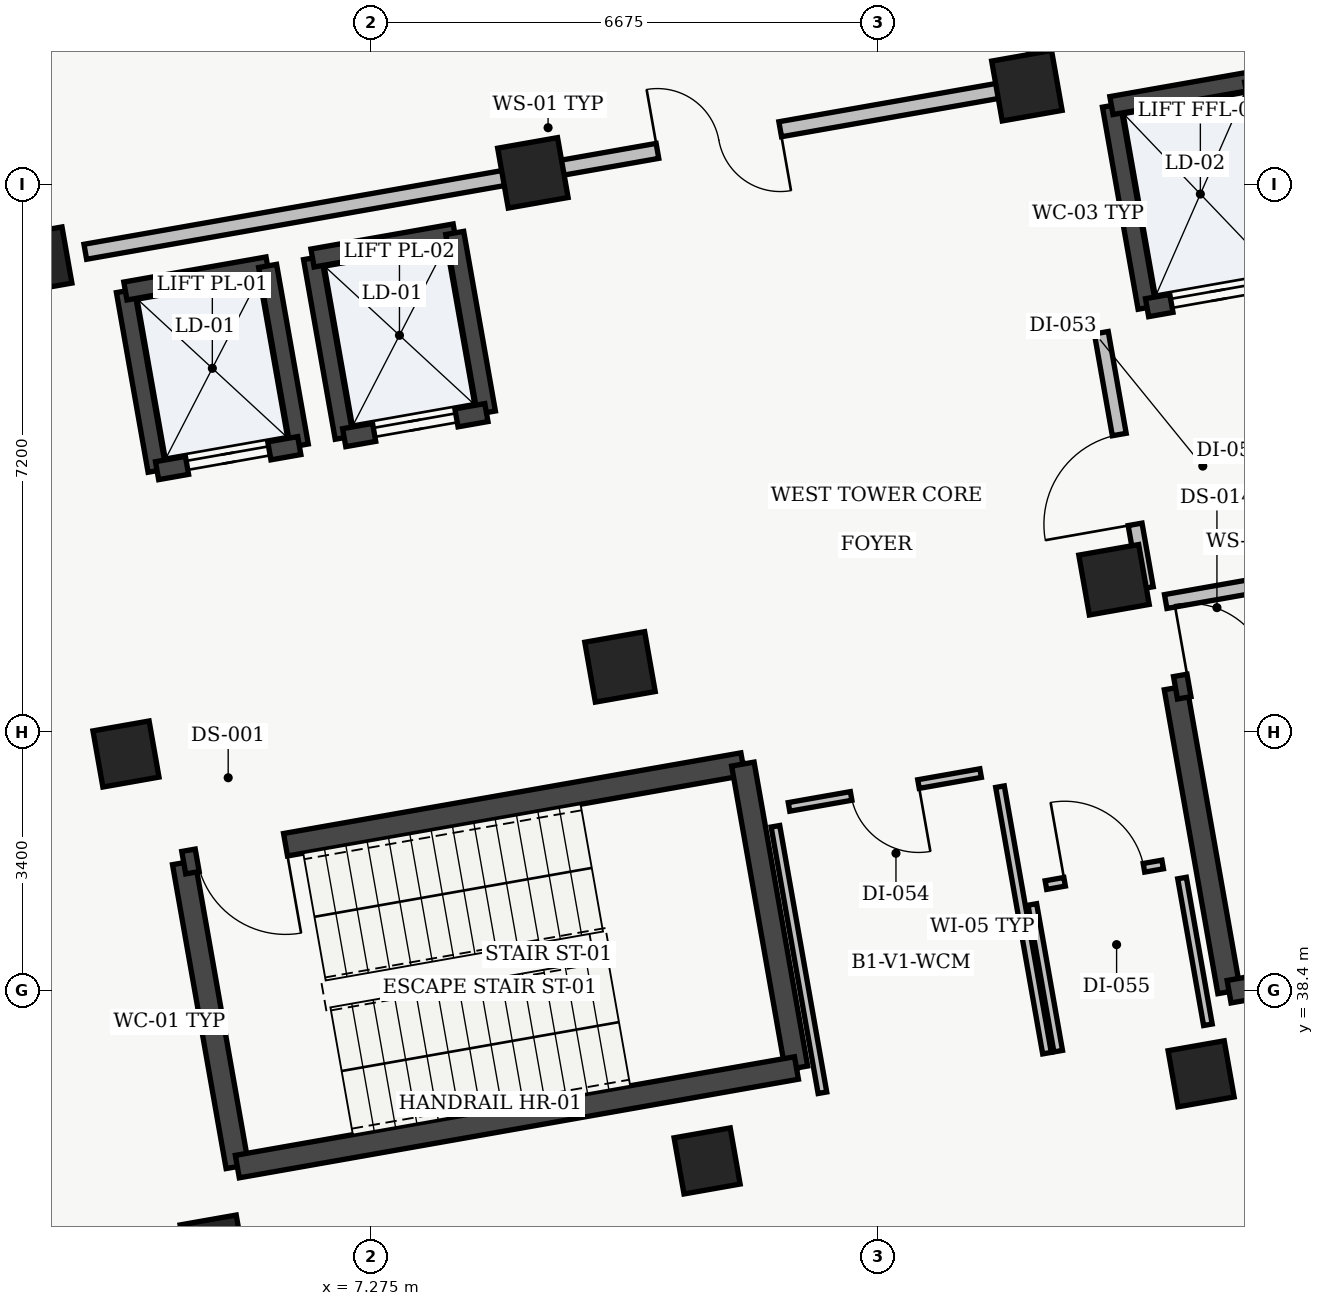
"""IFC4 building model, lengths in metres.
Left out: names, types, materials, properties, quantities, classifications, styles, units other than length and angle.
Written with IfcOpenShell. Run it as: python <this file> out.ifc"""

import sys

from ifc_helpers import new_model, si_unit, direction, frame, frame_2d, origin, origin_2d, place, context, subcontext, project, spatial, rectangle, extrude, element, fill, save


model = new_model("IFC4")
c1 = context("Model", 3, precision=1e-05, world=origin(), true_north=direction((0.0, 1.0)))
c2 = subcontext(c1, "Body", "Model", "MODEL_VIEW")
j1 = project(units=[si_unit("LENGTHUNIT", "METRE"), si_unit("PLANEANGLEUNIT", "RADIAN")], contexts=[c1])
p1 = place(None, origin())
s1 = spatial("IfcSite", under=j1, at=p1, CompositionType="ELEMENT")
p2 = place(p1, origin())
s2 = spatial("IfcBuilding", under=s1, at=p2, CompositionType="ELEMENT")
p3 = place(p2, frame((0.0, 0.0, -4.8)))
s3 = spatial("IfcBuildingStorey", under=s2, at=p3, CompositionType="ELEMENT", Elevation=-4.8)
for number, where, z_axis, x_axis in (
    (1, (5.2, 35.01, 0.0), (0.0, 0.0, 1.0), (0.985, 0.174, 0.0)),
    (2, (4.054, 41.51, 0.0), (0.0, 0.0, 1.0), (0.985, 0.174, 0.0)),
    (3, (2.908, 48.01, 0.0), (0.0, 0.0, 1.0), (0.985, 0.174, 0.0)),
    (4, (11.7, 36.156, 0.0), (0.0, 0.0, 1.0), (0.985, 0.174, 0.0)),
):
    element("IfcColumn", number, at=place(p3, frame(where, z_axis=z_axis, x_axis=x_axis)), inside=s3, PredefinedType="COLUMN", context=c2, shape_type="SweptSolid", body=[
        extrude(rectangle(XDim=0.75, YDim=0.75, at=origin_2d()), origin(), (0.0, 0.0, 1.0), 4.61),
    ])
for number, where, z_axis, x_axis in (
    (5, (10.554, 42.656, 0.0), (0.0, 0.0, 1.0), (0.985, 0.174, 0.0)),
    (6, (9.407, 49.156, 0.0), (0.0, 0.0, 1.0), (0.985, 0.174, 0.0)),
):
    element("IfcColumn", number, at=place(p3, frame(where, z_axis=z_axis, x_axis=x_axis)), inside=s3, PredefinedType="COLUMN", context=c2, shape_type="SweptSolid", body=[
        extrude(rectangle(XDim=0.8, YDim=0.8, at=origin_2d()), origin(), (0.0, 0.0, 1.0), 4.61),
    ])
p4 = place(p3, frame((18.199, 37.302, 0.0), z_axis=(0.0, 0.0, 1.0), x_axis=(0.984807753012, 0.173648177667, 0.0)))
e7 = element("IfcColumn", 7, at=p4, inside=s3, PredefinedType="COLUMN", context=c2, shape_type="SweptSolid", body=[
    extrude(rectangle(XDim=0.75, YDim=0.75, at=origin_2d()), origin(), (0.0, 0.0, 1.0), 4.61),
])
for number, where, z_axis, x_axis in (
    (8, (17.053, 43.802, 0.0), (0.0, 0.0, 1.0), (0.985, 0.174, 0.0)),
    (9, (15.907, 50.302, 0.0), (0.0, 0.0, 1.0), (0.985, 0.174, 0.0)),
):
    element("IfcColumn", number, at=place(p3, frame(where, z_axis=z_axis, x_axis=x_axis)), inside=s3, PredefinedType="COLUMN", context=c2, shape_type="SweptSolid", body=[
        extrude(rectangle(XDim=0.8, YDim=0.8, at=origin_2d()), origin(), (0.0, 0.0, 1.0), 4.61),
    ])
p5 = place(p3, frame((5.519, 36.082, 0.0), z_axis=(0.0, 0.0, 1.0), x_axis=(-0.173665267602, 0.984804739443, 0.0)))
e10 = element("IfcWall", 10, at=p5, inside=s3, PredefinedType="SHEAR", context=c2, shape_type="SweptSolid", body=[
    extrude(rectangle(XDim=4.06, YDim=0.3, at=frame_2d((2.03, 0.0))), origin(), (0.0, 0.0, 1.0), 4.58),
])
p6 = place(p3, frame((4.814, 40.08, 0.0), z_axis=(0.0, 0.0, 1.0), x_axis=(0.984802636214, 0.173677193974, 0.0)))
e11 = element("IfcWall", 11, at=p6, inside=s3, PredefinedType="SHEAR", context=c2, shape_type="SweptSolid", body=[
    extrude(rectangle(XDim=7.47, YDim=0.3, at=frame_2d((3.735, 0.0))), origin(), (0.0, 0.0, 1.0), 4.58),
])
p7 = place(p6, frame((0.18, 0.0, 0.0)))
e12 = element("IfcOpeningElement", 12, at=p7, cuts=e11, PredefinedType="OPENING", context=c2, shape_type="SweptSolid", body=[
    extrude(rectangle(XDim=1.18, YDim=2.15, at=frame_2d((0.59, 1.075))), frame((0.0, 0.15, 0.0), z_axis=(0.0, -1.0, 0.0), x_axis=(1.0, 0.0, 0.0)), (0.0, 0.0, 1.0), 0.3),
])
p8 = place(p3, frame((12.17, 41.377, 0.0), z_axis=(0.0, 0.0, 1.0), x_axis=(0.173654983803, -0.984806552883, 0.0)))
e13 = element("IfcWall", 13, at=p8, inside=s3, PredefinedType="SHEAR", context=c2, shape_type="SweptSolid", body=[
    extrude(rectangle(XDim=4.06, YDim=0.3, at=frame_2d((2.03, 0.0))), origin(), (0.0, 0.0, 1.0), 4.58),
])
p9 = place(p3, frame((12.875, 37.379, 0.0), z_axis=(0.0, 0.0, 1.0), x_axis=(-0.984808225754, -0.173645496596, 0.0)))
e14 = element("IfcWall", 14, at=p9, inside=s3, PredefinedType="SHEAR", context=c2, shape_type="SweptSolid", body=[
    extrude(rectangle(XDim=7.47, YDim=0.3, at=frame_2d((3.735, 0.0))), origin(), (0.0, 0.0, 1.0), 4.58),
])
p10 = place(p3, frame((18.567, 38.383, 0.0), z_axis=(0.0, 0.0, 1.0), x_axis=(-0.173606946886, 0.984815022221, 0.0)))
e15 = element("IfcWall", 15, at=p10, inside=s3, PredefinedType="SHEAR", context=c2, shape_type="SweptSolid", body=[
    extrude(rectangle(XDim=4.06, YDim=0.3, at=frame_2d((2.03, 0.0))), origin(), (0.0, 0.0, 1.0), 4.58),
])
p11 = place(p3, frame((17.863, 42.381, 0.0), z_axis=(0.0, 0.0, 1.0), x_axis=(0.984808225754, 0.173645496596, 0.0)))
e16 = element("IfcWall", 16, at=p11, inside=s3, PredefinedType="SHEAR", context=c2, shape_type="SweptSolid", body=[
    extrude(rectangle(XDim=7.47, YDim=0.3, at=frame_2d((3.735, 0.0))), origin(), (0.0, 0.0, 1.0), 4.58),
])
p12 = place(p11, frame((0.18, 0.0, 0.0)))
e17 = element("IfcOpeningElement", 17, at=p12, cuts=e16, PredefinedType="OPENING", context=c2, shape_type="SweptSolid", body=[
    extrude(rectangle(XDim=1.08, YDim=2.15, at=frame_2d((0.54, 1.075))), frame((0.0, 0.15, 0.0), z_axis=(0.0, -1.0, 0.0), x_axis=(1.0, 0.0, 0.0)), (0.0, 0.0, 1.0), 0.3),
])
p13 = place(p3, frame((25.924, 39.68, 0.0), z_axis=(0.0, 0.0, 1.0), x_axis=(-0.984809211193, -0.173639907711, 0.0)))
e18 = element("IfcWall", 18, at=p13, inside=s3, PredefinedType="SHEAR", context=c2, shape_type="SweptSolid", body=[
    extrude(rectangle(XDim=7.47, YDim=0.3, at=frame_2d((3.735, 0.0))), origin(), (0.0, 0.0, 1.0), 4.58),
])
p14 = place(p3, frame((17.488, 47.382, 0.0), z_axis=(0.0, 0.0, 1.0), x_axis=(-0.173615102578, 0.98481358447, 0.0)))
e19 = element("IfcWall", 19, at=p14, inside=s3, PredefinedType="SHEAR", context=c2, shape_type="SweptSolid", body=[
    extrude(rectangle(XDim=2.7, YDim=0.24, at=frame_2d((1.35, 0.0))), origin(), (0.0, 0.0, 1.0), 4.58),
])
p15 = place(p3, frame((17.02, 50.041, 0.0), z_axis=(0.0, 0.0, 1.0), x_axis=(0.984815882103, 0.173602068988, 0.0)))
e20 = element("IfcWall", 20, at=p15, inside=s3, PredefinedType="SHEAR", context=c2, shape_type="SweptSolid", body=[
    extrude(rectangle(XDim=1.9, YDim=0.24, at=frame_2d((0.95, 0.0))), origin(), (0.0, 0.0, 1.0), 4.58),
])
p16 = place(p3, frame((19.359, 47.712, 0.0), z_axis=(0.0, 0.0, 1.0), x_axis=(-0.984815882103, -0.173602068988, 0.0)))
e21 = element("IfcWall", 21, at=p16, inside=s3, PredefinedType="SHEAR", context=c2, shape_type="SweptSolid", body=[
    extrude(rectangle(XDim=1.9, YDim=0.24, at=frame_2d((0.95, 0.0))), origin(), (0.0, 0.0, 1.0), 4.58),
])
p17 = place(p16, frame((0.325, 0.0, 0.0)))
e22 = element("IfcOpeningElement", 22, at=p17, cuts=e21, PredefinedType="OPENING", context=c2, shape_type="SweptSolid", body=[
    extrude(rectangle(XDim=1.25, YDim=2.2, at=frame_2d((0.625, 1.1))), frame((0.0, 0.12, 0.0), z_axis=(0.0, -1.0, 0.0), x_axis=(1.0, 0.0, 0.0)), (0.0, 0.0, 1.0), 0.24),
])
p18 = place(p3, frame((4.463, 45.237, 0.0), z_axis=(0.0, 0.0, 1.0), x_axis=(-0.173646056486, 0.984808127031, 0.0)))
e23 = element("IfcWall", 23, at=p18, inside=s3, PredefinedType="SHEAR", context=c2, shape_type="SweptSolid", body=[
    extrude(rectangle(XDim=2.4, YDim=0.24, at=frame_2d((1.2, 0.0))), origin(), (0.0, 0.0, 1.0), 4.58),
])
p19 = place(p3, frame((4.046, 47.601, 0.0), z_axis=(0.0, 0.0, 1.0), x_axis=(0.984793905749, 0.173726691098, 0.0)))
e24 = element("IfcWall", 24, at=p19, inside=s3, PredefinedType="SHEAR", context=c2, shape_type="SweptSolid", body=[
    extrude(rectangle(XDim=1.9, YDim=0.24, at=frame_2d((0.95, 0.0))), origin(), (0.0, 0.0, 1.0), 4.58),
])
p20 = place(p3, frame((5.917, 47.931, 0.0), z_axis=(0.0, 0.0, 1.0), x_axis=(0.173646056486, -0.984808127031, 0.0)))
e25 = element("IfcWall", 25, at=p20, inside=s3, PredefinedType="SHEAR", context=c2, shape_type="SweptSolid", body=[
    extrude(rectangle(XDim=2.4, YDim=0.24, at=frame_2d((1.2, 0.0))), origin(), (0.0, 0.0, 1.0), 4.58),
])
p21 = place(p3, frame((6.334, 45.567, 0.0), z_axis=(0.0, 0.0, 1.0), x_axis=(-0.984793905749, -0.173726691098, 0.0)))
e26 = element("IfcWall", 26, at=p21, inside=s3, PredefinedType="SHEAR", context=c2, shape_type="SweptSolid", body=[
    extrude(rectangle(XDim=1.9, YDim=0.24, at=frame_2d((0.95, 0.0))), origin(), (0.0, 0.0, 1.0), 4.58),
])
p22 = place(p21, frame((0.4, 0.0, 0.0)))
e27 = element("IfcOpeningElement", 27, at=p22, cuts=e26, PredefinedType="OPENING", context=c2, shape_type="SweptSolid", body=[
    extrude(rectangle(XDim=1.1, YDim=2.2, at=frame_2d((0.55, 1.1))), frame((0.0, 0.12, 0.0), z_axis=(0.0, -1.0, 0.0), x_axis=(1.0, 0.0, 0.0)), (0.0, 0.0, 1.0), 0.24),
])
p23 = place(p3, frame((6.925, 45.671, 0.0), z_axis=(0.0, 0.0, 1.0), x_axis=(-0.173646056486, 0.984808127031, 0.0)))
e28 = element("IfcWall", 28, at=p23, inside=s3, PredefinedType="SHEAR", context=c2, shape_type="SweptSolid", body=[
    extrude(rectangle(XDim=2.4, YDim=0.24, at=frame_2d((1.2, 0.0))), origin(), (0.0, 0.0, 1.0), 4.58),
])
p24 = place(p3, frame((6.508, 48.035, 0.0), z_axis=(0.0, 0.0, 1.0), x_axis=(0.984793905749, 0.173726691098, 0.0)))
e29 = element("IfcWall", 29, at=p24, inside=s3, PredefinedType="SHEAR", context=c2, shape_type="SweptSolid", body=[
    extrude(rectangle(XDim=1.9, YDim=0.24, at=frame_2d((0.95, 0.0))), origin(), (0.0, 0.0, 1.0), 4.58),
])
p25 = place(p3, frame((8.379, 48.365, 0.0), z_axis=(0.0, 0.0, 1.0), x_axis=(0.173646056486, -0.984808127031, 0.0)))
e30 = element("IfcWall", 30, at=p25, inside=s3, PredefinedType="SHEAR", context=c2, shape_type="SweptSolid", body=[
    extrude(rectangle(XDim=2.4, YDim=0.24, at=frame_2d((1.2, 0.0))), origin(), (0.0, 0.0, 1.0), 4.58),
])
p26 = place(p3, frame((8.796, 46.001, 0.0), z_axis=(0.0, 0.0, 1.0), x_axis=(-0.984793905749, -0.173726691098, 0.0)))
e31 = element("IfcWall", 31, at=p26, inside=s3, PredefinedType="SHEAR", context=c2, shape_type="SweptSolid", body=[
    extrude(rectangle(XDim=1.9, YDim=0.24, at=frame_2d((0.95, 0.0))), origin(), (0.0, 0.0, 1.0), 4.58),
])
p27 = place(p26, frame((0.4, 0.0, 0.0)))
e32 = element("IfcOpeningElement", 32, at=p27, cuts=e31, PredefinedType="OPENING", context=c2, shape_type="SweptSolid", body=[
    extrude(rectangle(XDim=1.1, YDim=2.2, at=frame_2d((0.55, 1.1))), frame((0.0, 0.12, 0.0), z_axis=(0.0, -1.0, 0.0), x_axis=(1.0, 0.0, 0.0)), (0.0, 0.0, 1.0), 0.24),
])
p28 = place(p3, frame((17.733, 43.516, 0.0), z_axis=(0.0, 0.0, 1.0), x_axis=(0.984808483292, 0.173644035992, 0.0)))
e33 = element("IfcWall", 33, at=p28, inside=s3, PredefinedType="SOLIDWALL", context=c2, shape_type="SweptSolid", body=[
    extrude(rectangle(XDim=2.76, YDim=0.185, at=frame_2d((1.38, 0.0))), origin(), (0.0, 0.0, 1.0), 4.25),
])
p29 = place(p3, frame((16.886, 47.052, 0.0), z_axis=(0.0, 0.0, 1.0), x_axis=(0.173621956536, -0.984812376145, 0.0)))
e34 = element("IfcWall", 34, at=p29, inside=s3, PredefinedType="SOLIDWALL", context=c2, shape_type="SweptSolid", body=[
    extrude(rectangle(XDim=3.41, YDim=0.185, at=frame_2d((1.705, 0.0))), origin(), (0.0, 0.0, 1.0), 4.25),
])
p30 = place(p29, frame((1.36, 0.0, 0.0)))
e35 = element("IfcOpeningElement", 35, at=p30, cuts=e34, PredefinedType="OPENING", context=c2, shape_type="SweptSolid", body=[
    extrude(rectangle(XDim=1.2, YDim=2.15, at=frame_2d((0.6, 1.075))), frame((0.0, 0.093, 0.0), z_axis=(0.0, -1.0, 0.0), x_axis=(1.0, 0.0, 0.0)), (0.0, 0.0, 1.0), 0.185),
])
p31 = place(p3, frame((16.171, 37.574, 0.0), z_axis=(0.0, 0.0, 1.0), x_axis=(-0.173644490041, 0.984808403233, 0.0)))
e36 = element("IfcWall", 36, at=p31, inside=s3, PredefinedType="PARTITIONING", context=c2, shape_type="SweptSolid", body=[
    extrude(rectangle(XDim=3.56, YDim=0.115, at=frame_2d((1.78, 0.0))), origin(), (0.0, 0.0, 1.0), 4.25),
])
p32 = place(p3, frame((15.298, 41.259, 0.0), z_axis=(0.0, 0.0, 1.0), x_axis=(-0.984803714572, -0.17367107924, 0.0)))
e37 = element("IfcWall", 37, at=p32, inside=s3, PredefinedType="PARTITIONING", context=c2, shape_type="SweptSolid", body=[
    extrude(rectangle(XDim=2.56, YDim=0.115, at=frame_2d((1.28, 0.0))), origin(), (0.0, 0.0, 1.0), 4.25),
])
p33 = place(p32, frame((0.83, 0.0, 0.0)))
e38 = element("IfcOpeningElement", 38, at=p33, cuts=e37, PredefinedType="OPENING", context=c2, shape_type="SweptSolid", body=[
    extrude(rectangle(XDim=0.9, YDim=2.1, at=frame_2d((0.45, 1.05))), frame((0.0, 0.058, 0.0), z_axis=(0.0, -1.0, 0.0), x_axis=(1.0, 0.0, 0.0)), (0.0, 0.0, 1.0), 0.115),
])
p34 = place(p3, frame((12.599, 40.559, 0.0), z_axis=(0.0, 0.0, 1.0), x_axis=(0.173644490041, -0.984808403233, 0.0)))
e39 = element("IfcWall", 39, at=p34, inside=s3, PredefinedType="PARTITIONING", context=c2, shape_type="SweptSolid", body=[
    extrude(rectangle(XDim=3.56, YDim=0.115, at=frame_2d((1.78, 0.0))), origin(), (0.0, 0.0, 1.0), 4.25),
])
p35 = place(p3, frame((18.289, 37.948, 0.0), z_axis=(0.0, 0.0, 1.0), x_axis=(-0.173643211285, 0.984808628706, 0.0)))
e40 = element("IfcWall", 40, at=p35, inside=s3, PredefinedType="PARTITIONING", context=c2, shape_type="SweptSolid", body=[
    extrude(rectangle(XDim=1.96, YDim=0.115, at=frame_2d((0.98, 0.0))), origin(), (0.0, 0.0, 1.0), 3.945),
])
p36 = place(p3, frame((17.694, 40.056, 0.0), z_axis=(0.0, 0.0, 1.0), x_axis=(-0.984797734253, -0.173704987291, 0.0)))
e41 = element("IfcWall", 41, at=p36, inside=s3, PredefinedType="PARTITIONING", context=c2, shape_type="SweptSolid", body=[
    extrude(rectangle(XDim=1.56, YDim=0.115, at=frame_2d((0.78, 0.0))), origin(), (0.0, 0.0, 1.0), 4.25),
])
p37 = place(p36, frame((0.25, 0.0, 0.0)))
e42 = element("IfcOpeningElement", 42, at=p37, cuts=e41, PredefinedType="OPENING", context=c2, shape_type="SweptSolid", body=[
    extrude(rectangle(XDim=1.06, YDim=2.12, at=frame_2d((0.53, 1.06))), frame((0.0, 0.058, 0.0), z_axis=(0.0, -1.0, 0.0), x_axis=(1.0, 0.0, 0.0)), (0.0, 0.0, 1.0), 0.115),
])
p38 = place(p3, frame((15.979, 39.53, 0.0), z_axis=(0.0, 0.0, 1.0), x_axis=(0.173643211285, -0.984808628706, 0.0)))
e43 = element("IfcWall", 43, at=p38, inside=s3, PredefinedType="PARTITIONING", context=c2, shape_type="SweptSolid", body=[
    extrude(rectangle(XDim=1.96, YDim=0.115, at=frame_2d((0.98, 0.0))), origin(), (0.0, 0.0, 1.0), 4.25),
])
p39 = place(p3, frame((3.518, 48.117, 0.0), z_axis=(0.0, 0.0, 1.0), x_axis=(0.9848097689, 0.173636744608, 0.0)))
e44 = element("IfcWall", 44, at=p39, inside=s3, PredefinedType="SOLIDWALL", context=c2, shape_type="SweptSolid", body=[
    extrude(rectangle(XDim=12.56, YDim=0.2, at=frame_2d((6.28, 0.0))), origin(), (0.0, 0.0, 1.0), 3.845),
])
p40 = place(p39, frame((7.644, 0.0, 0.0)))
e45 = element("IfcOpeningElement", 45, at=p40, cuts=e44, PredefinedType="OPENING", context=c2, shape_type="SweptSolid", body=[
    extrude(rectangle(XDim=1.64, YDim=2.2, at=frame_2d((0.82, 1.1))), frame((0.0, 0.1, 0.0), z_axis=(0.0, -1.0, 0.0), x_axis=(1.0, 0.0, 0.0)), (0.0, 0.0, 1.0), 0.2),
])
p41 = place(p3, frame((16.066, 50.553, 0.0), z_axis=(0.0, 0.0, 1.0), x_axis=(-0.173649928941, 0.984807444214, 0.0)))
e46 = element("IfcWall", 46, at=p41, inside=s3, PredefinedType="SOLIDWALL", context=c2, shape_type="SweptSolid", body=[
    extrude(rectangle(XDim=5.76, YDim=0.2, at=frame_2d((2.88, 0.0))), origin(), (0.0, 0.0, 1.0), 3.945),
])
p42 = place(p3, frame((18.611, 56.851, 0.0), z_axis=(0.0, 0.0, 1.0), x_axis=(0.173656551629, -0.98480627642, 0.0)))
e47 = element("IfcWall", 47, at=p42, inside=s3, PredefinedType="SOLIDWALL", context=c2, shape_type="SweptSolid", body=[
    extrude(rectangle(XDim=8.76, YDim=0.2, at=frame_2d((4.38, 0.0))), origin(), (0.0, 0.0, 1.0), 4.25),
])
p43 = place(p7, origin())
e48 = element("IfcDoor", 48, at=p43, inside=s3, OperationType="SINGLE_SWING_RIGHT", PredefinedType="DOOR", context=c2, shape_type="SweptSolid", body=[
    extrude(rectangle(XDim=1.18, YDim=2.15, at=frame_2d((0.59, 1.075))), frame((0.0, 0.025, 0.0), z_axis=(0.0, -1.0, 0.0), x_axis=(1.0, 0.0, 0.0)), (0.0, 0.0, 1.0), 0.05),
])
fill(e12, e48)
p44 = place(p12, origin())
e49 = element("IfcDoor", 49, at=p44, inside=s3, OperationType="SINGLE_SWING_LEFT", PredefinedType="DOOR", context=c2, shape_type="SweptSolid", body=[
    extrude(rectangle(XDim=1.08, YDim=2.15, at=frame_2d((0.54, 1.075))), frame((0.0, 0.025, 0.0), z_axis=(0.0, -1.0, 0.0), x_axis=(1.0, 0.0, 0.0)), (0.0, 0.0, 1.0), 0.05),
])
fill(e17, e49)
p45 = place(p17, origin())
e50 = element("IfcDoor", 50, at=p45, inside=s3, OperationType="SLIDING_TO_RIGHT", PredefinedType="DOOR", context=c2, shape_type="SweptSolid", body=[
    extrude(rectangle(XDim=1.25, YDim=2.2, at=frame_2d((0.625, 1.1))), frame((0.0, 0.025, 0.0), z_axis=(0.0, -1.0, 0.0), x_axis=(1.0, 0.0, 0.0)), (0.0, 0.0, 1.0), 0.05),
])
fill(e22, e50)
p46 = place(p22, origin())
e51 = element("IfcDoor", 51, at=p46, inside=s3, OperationType="SLIDING_TO_LEFT", PredefinedType="DOOR", context=c2, shape_type="SweptSolid", body=[
    extrude(rectangle(XDim=1.1, YDim=2.2, at=frame_2d((0.55, 1.1))), frame((0.0, 0.025, 0.0), z_axis=(0.0, -1.0, 0.0), x_axis=(1.0, 0.0, 0.0)), (0.0, 0.0, 1.0), 0.05),
])
fill(e27, e51)
p47 = place(p27, origin())
e52 = element("IfcDoor", 52, at=p47, inside=s3, OperationType="SLIDING_TO_LEFT", PredefinedType="DOOR", context=c2, shape_type="SweptSolid", body=[
    extrude(rectangle(XDim=1.1, YDim=2.2, at=frame_2d((0.55, 1.1))), frame((0.0, 0.025, 0.0), z_axis=(0.0, -1.0, 0.0), x_axis=(1.0, 0.0, 0.0)), (0.0, 0.0, 1.0), 0.05),
])
fill(e32, e52)
p48 = place(p30, origin())
e53 = element("IfcDoor", 53, at=p48, inside=s3, OperationType="SINGLE_SWING_RIGHT", PredefinedType="DOOR", context=c2, shape_type="SweptSolid", body=[
    extrude(rectangle(XDim=1.2, YDim=2.15, at=frame_2d((0.6, 1.075))), frame((0.0, 0.025, 0.0), z_axis=(0.0, -1.0, 0.0), x_axis=(1.0, 0.0, 0.0)), (0.0, 0.0, 1.0), 0.05),
])
fill(e35, e53)
p49 = place(p33, origin())
e54 = element("IfcDoor", 54, at=p49, inside=s3, OperationType="SINGLE_SWING_LEFT", PredefinedType="DOOR", context=c2, shape_type="SweptSolid", body=[
    extrude(rectangle(XDim=0.9, YDim=2.1, at=frame_2d((0.45, 1.05))), frame((0.0, 0.025, 0.0), z_axis=(0.0, -1.0, 0.0), x_axis=(1.0, 0.0, 0.0)), (0.0, 0.0, 1.0), 0.05),
])
fill(e38, e54)
p50 = place(p37, origin())
e55 = element("IfcDoor", 55, at=p50, inside=s3, OperationType="SINGLE_SWING_RIGHT", PredefinedType="DOOR", context=c2, shape_type="SweptSolid", body=[
    extrude(rectangle(XDim=1.06, YDim=2.12, at=frame_2d((0.53, 1.06))), frame((0.0, 0.025, 0.0), z_axis=(0.0, -1.0, 0.0), x_axis=(1.0, 0.0, 0.0)), (0.0, 0.0, 1.0), 0.05),
])
fill(e42, e55)
p51 = place(p40, origin())
e56 = element("IfcDoor", 56, at=p51, inside=s3, OperationType="DOUBLE_DOOR_SINGLE_SWING", PredefinedType="DOOR", context=c2, shape_type="SweptSolid", body=[
    extrude(rectangle(XDim=1.64, YDim=2.2, at=frame_2d((0.82, 1.1))), frame((0.0, 0.025, 0.0), z_axis=(0.0, -1.0, 0.0), x_axis=(1.0, 0.0, 0.0)), (0.0, 0.0, 1.0), 0.05),
])
fill(e45, e56)
save(model, sys.argv[1])
